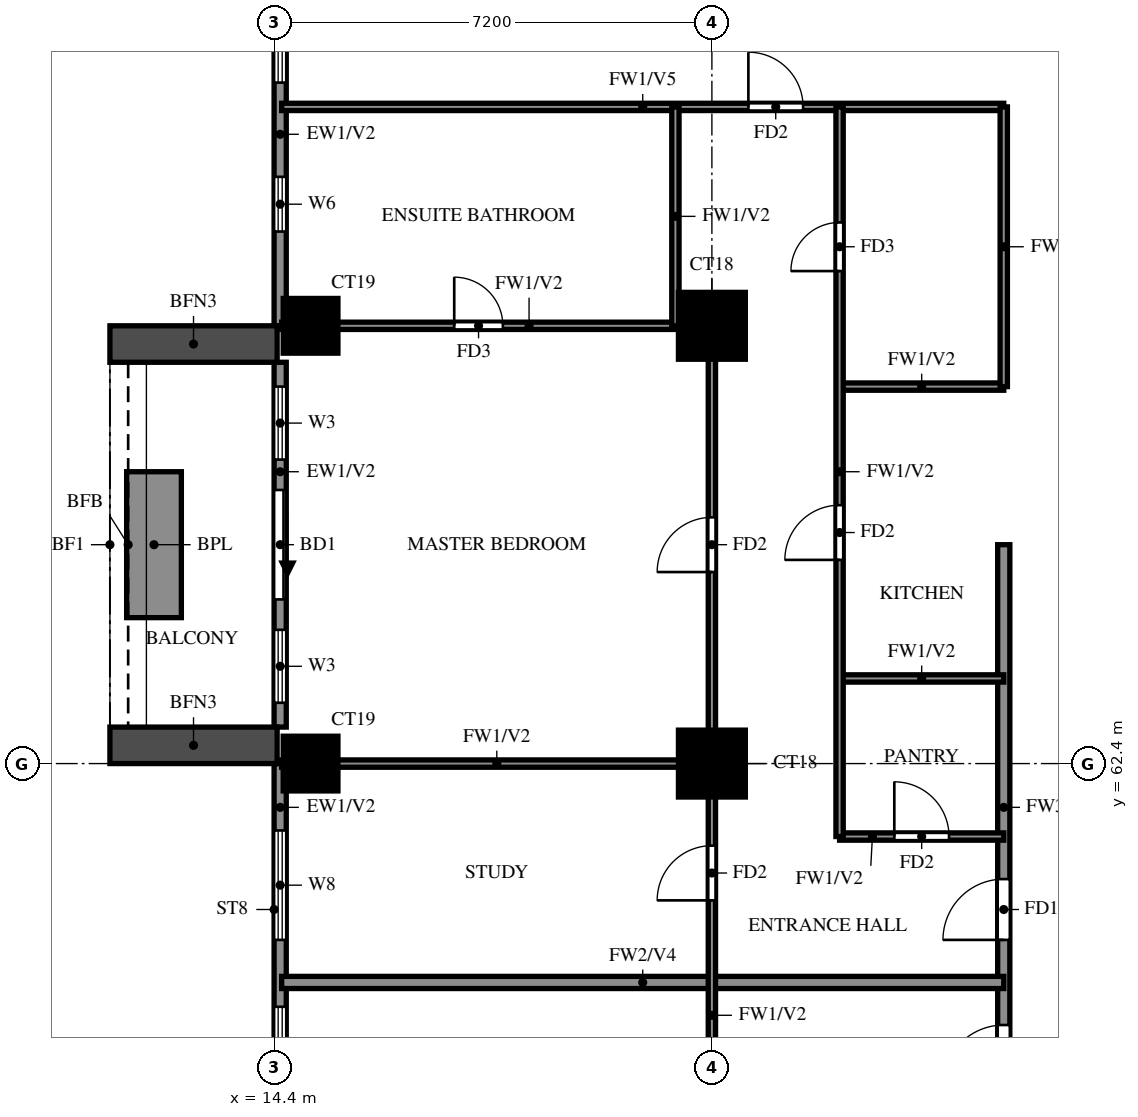
"""IFC4 building model, lengths in metres.
Left out: names, types, materials, properties, quantities, classifications, styles, units other than length and angle.
Written with IfcOpenShell. Run it as: python <this file> out.ifc"""

import sys

from ifc_helpers import new_model, si_unit, direction, frame, frame_2d, origin, origin_2d, place, context, subcontext, project, spatial, rectangle, extrude, source, transform, mapped, element, fill, save


model = new_model("IFC4")
c1 = context("Model", 3, precision=1e-05, world=origin(), true_north=direction((0.0, 1.0)))
c2 = subcontext(c1, "Body", "Model", "MODEL_VIEW")
j1 = project(units=[si_unit("LENGTHUNIT", "METRE"), si_unit("PLANEANGLEUNIT", "RADIAN")], contexts=[c1])
p1 = place(None, origin())
s1 = spatial("IfcSite", under=j1, at=p1, CompositionType="ELEMENT")
p2 = place(p1, origin())
s2 = spatial("IfcBuilding", under=s1, at=p2, CompositionType="ELEMENT")
p3 = place(p2, frame((0.0, 0.0, 130.5)))
s3 = spatial("IfcBuildingStorey", under=s2, at=p3, CompositionType="ELEMENT", Elevation=130.5)
m1 = source(origin(), c2, "Body", "SweptSolid", [
    extrude(rectangle(XDim=0.9, YDim=0.9, at=origin_2d()), origin(), (0.0, 0.0, 1.0), 3.2),
])
p4 = place(p3, frame((15.0, 62.4, 0.0), z_axis=(0.0, 0.0, 1.0), x_axis=(1.0, 0.0, 0.0)))
e1 = element("IfcColumn", 1, at=p4, inside=s3, PredefinedType="COLUMN", context=c2, shape_type="MappedRepresentation", body=[
    mapped(m1, transform((0.0, 0.0, 0.0))),
])
m2 = source(origin(), c2, "Body", "SweptSolid", [
    extrude(rectangle(XDim=1.1, YDim=1.1, at=origin_2d()), origin(), (0.0, 0.0, 1.0), 3.2),
])
p5 = place(p3, frame((21.6, 62.4, 0.0), z_axis=(0.0, 0.0, 1.0), x_axis=(1.0, 0.0, 0.0)))
e2 = element("IfcColumn", 2, at=p5, inside=s3, PredefinedType="COLUMN", context=c2, shape_type="MappedRepresentation", body=[
    mapped(m2, transform((0.0, 0.0, 0.0))),
])
p6 = place(p3, frame((15.0, 69.6, 0.0), z_axis=(0.0, 0.0, 1.0), x_axis=(1.0, 0.0, 0.0)))
e3 = element("IfcColumn", 3, at=p6, inside=s3, PredefinedType="COLUMN", context=c2, shape_type="MappedRepresentation", body=[
    mapped(m1, transform((0.0, 0.0, 0.0))),
])
p7 = place(p3, frame((21.6, 69.6, 0.0), z_axis=(0.0, 0.0, 1.0), x_axis=(1.0, 0.0, 0.0)))
e4 = element("IfcColumn", 4, at=p7, inside=s3, PredefinedType="COLUMN", context=c2, shape_type="MappedRepresentation", body=[
    mapped(m2, transform((0.0, 0.0, 0.0))),
])
p8 = place(p3, frame((14.5, 76.6, 0.0), z_axis=(0.0, 0.0, 1.0), x_axis=(0.0, -1.0, 0.0)))
e5 = element("IfcWall", 5, at=p8, inside=s3, PredefinedType="SOLIDWALL", context=c2, shape_type="SweptSolid", body=[
    extrude(rectangle(XDim=7.0, YDim=0.2, at=frame_2d((3.5, 0.0))), origin(), (0.0, 0.0, 1.0), 3.2),
])
p9 = place(p8, frame((4.55, 0.0, 1.5)))
e6 = element("IfcOpeningElement", 6, at=p9, cuts=e5, PredefinedType="OPENING", context=c2, shape_type="SweptSolid", body=[
    extrude(rectangle(XDim=0.9, YDim=0.9, at=frame_2d((0.45, 0.45))), frame((0.0, 0.11, 0.0), z_axis=(0.0, -1.0, 0.0), x_axis=(1.0, 0.0, 0.0)), (0.0, 0.0, 1.0), 0.22),
])
p10 = place(p8, frame((0.6, 0.0, 0.6)))
e7 = element("IfcOpeningElement", 7, at=p10, cuts=e5, PredefinedType="OPENING", context=c2, shape_type="SweptSolid", body=[
    extrude(rectangle(XDim=2.4, YDim=2.4, at=frame_2d((1.2, 1.2))), frame((0.0, 0.11, 0.0), z_axis=(0.0, -1.0, 0.0), x_axis=(1.0, 0.0, 0.0)), (0.0, 0.0, 1.0), 0.22),
])
p11 = place(p3, frame((14.5, 69.0, 0.0), z_axis=(0.0, 0.0, 1.0), x_axis=(0.0, -1.0, 0.0)))
e8 = element("IfcWall", 8, at=p11, inside=s3, PredefinedType="SOLIDWALL", context=c2, shape_type="SweptSolid", body=[
    extrude(rectangle(XDim=6.0, YDim=0.2, at=frame_2d((3.0, 0.0))), origin(), (0.0, 0.0, 1.0), 3.2),
])
p12 = place(p11, frame((2.1, 0.0, 0.0)))
e9 = element("IfcOpeningElement", 9, at=p12, cuts=e8, PredefinedType="OPENING", context=c2, shape_type="SweptSolid", body=[
    extrude(rectangle(XDim=1.8, YDim=2.4, at=frame_2d((0.9, 1.2))), frame((0.0, 0.11, 0.0), z_axis=(0.0, -1.0, 0.0), x_axis=(1.0, 0.0, 0.0)), (0.0, 0.0, 1.0), 0.22),
])
p13 = place(p11, frame((0.4, 0.0, 0.6)))
e10 = element("IfcOpeningElement", 10, at=p13, cuts=e8, PredefinedType="OPENING", context=c2, shape_type="SweptSolid", body=[
    extrude(rectangle(XDim=1.2, YDim=2.4, at=frame_2d((0.6, 1.2))), frame((0.0, 0.11, 0.0), z_axis=(0.0, -1.0, 0.0), x_axis=(1.0, 0.0, 0.0)), (0.0, 0.0, 1.0), 0.22),
])
p14 = place(p11, frame((4.4, 0.0, 0.6)))
e11 = element("IfcOpeningElement", 11, at=p14, cuts=e8, PredefinedType="OPENING", context=c2, shape_type="SweptSolid", body=[
    extrude(rectangle(XDim=1.2, YDim=2.4, at=frame_2d((0.6, 1.2))), frame((0.0, 0.11, 0.0), z_axis=(0.0, -1.0, 0.0), x_axis=(1.0, 0.0, 0.0)), (0.0, 0.0, 1.0), 0.22),
])
p15 = place(p3, frame((14.5, 62.4, 0.0), z_axis=(0.0, 0.0, 1.0), x_axis=(0.0, -1.0, 0.0)))
e12 = element("IfcWall", 12, at=p15, inside=s3, PredefinedType="SOLIDWALL", context=c2, shape_type="SweptSolid", body=[
    extrude(rectangle(XDim=7.2, YDim=0.2, at=frame_2d((3.6, 0.0))), origin(), (0.0, 0.0, 1.0), 3.2),
])
p16 = place(p15, frame((4.0, 0.0, 0.6)))
e13 = element("IfcOpeningElement", 13, at=p16, cuts=e12, PredefinedType="OPENING", context=c2, shape_type="SweptSolid", body=[
    extrude(rectangle(XDim=2.4, YDim=2.4, at=frame_2d((1.2, 1.2))), frame((0.0, 0.11, 0.0), z_axis=(0.0, -1.0, 0.0), x_axis=(1.0, 0.0, 0.0)), (0.0, 0.0, 1.0), 0.22),
])
p17 = place(p15, frame((1.1, 0.0, 0.6)))
e14 = element("IfcOpeningElement", 14, at=p17, cuts=e12, PredefinedType="OPENING", context=c2, shape_type="SweptSolid", body=[
    extrude(rectangle(XDim=1.8, YDim=2.4, at=frame_2d((0.9, 1.2))), frame((0.0, 0.11, 0.0), z_axis=(0.0, -1.0, 0.0), x_axis=(1.0, 0.0, 0.0)), (0.0, 0.0, 1.0), 0.22),
])
for number, where, z_axis, x_axis in (
    (15, (14.45, 69.3, 0.0), (0.0, 0.0, 1.0), (-1.0, 0.0, 0.0)),
    (16, (14.45, 62.7, 0.0), (0.0, 0.0, 1.0), (-1.0, 0.0, 0.0)),
):
    element("IfcWall", number, at=place(p3, frame(where, z_axis=z_axis, x_axis=x_axis)), inside=s3, PredefinedType="SOLIDWALL", context=c2, shape_type="SweptSolid", body=[
        extrude(rectangle(XDim=2.75, YDim=0.6, at=frame_2d((1.375, 0.0))), origin(), (0.0, 0.0, 1.0), 2.85),
    ])
p18 = place(p3, frame((12.425, 67.2, 0.0), z_axis=(0.0, 0.0, 1.0), x_axis=(0.0, -1.0, 0.0)))
e17 = element("IfcWall", 17, at=p18, inside=s3, PredefinedType="SOLIDWALL", context=c2, shape_type="SweptSolid", body=[
    extrude(rectangle(XDim=2.4, YDim=0.9, at=frame_2d((1.2, 0.0))), origin(), (0.0, 0.0, 1.0), 0.9),
])
p19 = place(p3, frame((26.4, 56.4, 0.0), z_axis=(0.0, 0.0, 1.0), x_axis=(0.0, 1.0, 0.0)))
e18 = element("IfcWall", 18, at=p19, inside=s3, PredefinedType="SOLIDWALL", context=c2, shape_type="SweptSolid", body=[
    extrude(rectangle(XDim=9.6, YDim=0.2, at=frame_2d((4.8, 0.0))), origin(), (0.0, 0.0, 1.0), 3.2),
])
p20 = place(p19, frame((0.7, 0.0, 0.0)))
e19 = element("IfcOpeningElement", 19, at=p20, cuts=e18, PredefinedType="OPENING", context=c2, shape_type="SweptSolid", body=[
    extrude(rectangle(XDim=1.0, YDim=2.1, at=frame_2d((0.5, 1.05))), frame((0.0, 0.11, 0.0), z_axis=(0.0, -1.0, 0.0), x_axis=(1.0, 0.0, 0.0)), (0.0, 0.0, 1.0), 0.22),
])
p21 = place(p19, frame((3.1, 0.0, 0.0)))
e20 = element("IfcOpeningElement", 20, at=p21, cuts=e18, PredefinedType="OPENING", context=c2, shape_type="SweptSolid", body=[
    extrude(rectangle(XDim=1.0, YDim=2.1, at=frame_2d((0.5, 1.05))), frame((0.0, 0.11, 0.0), z_axis=(0.0, -1.0, 0.0), x_axis=(1.0, 0.0, 0.0)), (0.0, 0.0, 1.0), 0.22),
])
p22 = place(p3, frame((14.525, 58.8, 0.0), z_axis=(0.0, 0.0, 1.0), x_axis=(1.0, 0.0, 0.0)))
e21 = element("IfcWall", 21, at=p22, inside=s3, PredefinedType="SOLIDWALL", context=c2, shape_type="SweptSolid", body=[
    extrude(rectangle(XDim=11.875, YDim=0.2, at=frame_2d((5.938, 0.0))), origin(), (0.0, 0.0, 1.0), 2.3),
])
p23 = place(p3, frame((23.7, 61.2, 0.0), z_axis=(0.0, 0.0, 1.0), x_axis=(1.0, 0.0, 0.0)))
e22 = element("IfcWall", 22, at=p23, inside=s3, PredefinedType="PARTITIONING", context=c2, shape_type="SweptSolid", body=[
    extrude(rectangle(XDim=2.7, YDim=0.12, at=frame_2d((1.35, 0.0))), origin(), (0.0, 0.0, 1.0), 3.2),
])
p24 = place(p23, frame((0.9, 0.0, 0.0)))
e23 = element("IfcOpeningElement", 23, at=p24, cuts=e22, PredefinedType="OPENING", context=c2, shape_type="SweptSolid", body=[
    extrude(rectangle(XDim=0.9, YDim=2.1, at=frame_2d((0.45, 1.05))), frame((0.0, 0.07, 0.0), z_axis=(0.0, -1.0, 0.0), x_axis=(1.0, 0.0, 0.0)), (0.0, 0.0, 1.0), 0.14),
])
p25 = place(p3, frame((14.525, 62.4, 0.0), z_axis=(0.0, 0.0, 1.0), x_axis=(1.0, 0.0, 0.0)))
e24 = element("IfcWall", 24, at=p25, inside=s3, PredefinedType="PARTITIONING", context=c2, shape_type="SweptSolid", body=[
    extrude(rectangle(XDim=7.075, YDim=0.12, at=frame_2d((3.538, 0.0))), origin(), (0.0, 0.0, 1.0), 3.2),
])
for number, where, z_axis, x_axis in (
    (25, (23.7, 63.8, 0.0), (0.0, 0.0, 1.0), (1.0, 0.0, 0.0)),
    (26, (23.7, 68.6, 0.0), (0.0, 0.0, 1.0), (1.0, 0.0, 0.0)),
):
    element("IfcWall", number, at=place(p3, frame(where, z_axis=z_axis, x_axis=x_axis)), inside=s3, PredefinedType="PARTITIONING", context=c2, shape_type="SweptSolid", body=[
        extrude(rectangle(XDim=2.7, YDim=0.12, at=frame_2d((1.35, 0.0))), origin(), (0.0, 0.0, 1.0), 3.2),
    ])
p26 = place(p3, frame((14.525, 69.6, 0.0), z_axis=(0.0, 0.0, 1.0), x_axis=(1.0, 0.0, 0.0)))
e27 = element("IfcWall", 27, at=p26, inside=s3, PredefinedType="PARTITIONING", context=c2, shape_type="SweptSolid", body=[
    extrude(rectangle(XDim=7.075, YDim=0.12, at=frame_2d((3.538, 0.0))), origin(), (0.0, 0.0, 1.0), 3.2),
])
p27 = place(p26, frame((2.837, 0.0, 0.0)))
e28 = element("IfcOpeningElement", 28, at=p27, cuts=e27, PredefinedType="OPENING", context=c2, shape_type="SweptSolid", body=[
    extrude(rectangle(XDim=0.8, YDim=2.1, at=frame_2d((0.4, 1.05))), frame((0.0, 0.07, 0.0), z_axis=(0.0, -1.0, 0.0), x_axis=(1.0, 0.0, 0.0)), (0.0, 0.0, 1.0), 0.14),
])
p28 = place(p3, frame((14.525, 73.2, 0.0), z_axis=(0.0, 0.0, 1.0), x_axis=(1.0, 0.0, 0.0)))
e29 = element("IfcWall", 29, at=p28, inside=s3, PredefinedType="PARTITIONING", context=c2, shape_type="SweptSolid", body=[
    extrude(rectangle(XDim=11.875, YDim=0.12, at=frame_2d((5.938, 0.0))), origin(), (0.0, 0.0, 1.0), 2.3),
])
p29 = place(p28, frame((7.675, 0.0, 0.0)))
e30 = element("IfcOpeningElement", 30, at=p29, cuts=e29, PredefinedType="OPENING", context=c2, shape_type="SweptSolid", body=[
    extrude(rectangle(XDim=0.9, YDim=2.1, at=frame_2d((0.45, 1.05))), frame((0.0, 0.07, 0.0), z_axis=(0.0, -1.0, 0.0), x_axis=(1.0, 0.0, 0.0)), (0.0, 0.0, 1.0), 0.14),
])
p30 = place(p3, frame((21.0, 69.6, 0.0), z_axis=(0.0, 0.0, 1.0), x_axis=(0.0, 1.0, 0.0)))
e31 = element("IfcWall", 31, at=p30, inside=s3, PredefinedType="PARTITIONING", context=c2, shape_type="SweptSolid", body=[
    extrude(rectangle(XDim=3.6, YDim=0.12, at=frame_2d((1.8, 0.0))), origin(), (0.0, 0.0, 1.0), 3.2),
])
p31 = place(p3, frame((21.6, 48.0, 0.0), z_axis=(0.0, 0.0, 1.0), x_axis=(0.0, 1.0, 0.0)))
e32 = element("IfcWall", 32, at=p31, inside=s3, PredefinedType="PARTITIONING", context=c2, shape_type="SweptSolid", body=[
    extrude(rectangle(XDim=21.6, YDim=0.12, at=frame_2d((10.8, 0.0))), origin(), (0.0, 0.0, 1.0), 3.2),
])
p32 = place(p31, frame((1.35, 0.0, 0.0)))
e33 = element("IfcOpeningElement", 33, at=p32, cuts=e32, PredefinedType="OPENING", context=c2, shape_type="SweptSolid", body=[
    extrude(rectangle(XDim=0.9, YDim=2.1, at=frame_2d((0.45, 1.05))), frame((0.0, 0.07, 0.0), z_axis=(0.0, -1.0, 0.0), x_axis=(1.0, 0.0, 0.0)), (0.0, 0.0, 1.0), 0.14),
])
p33 = place(p31, frame((7.95, 0.0, 0.0)))
e34 = element("IfcOpeningElement", 34, at=p33, cuts=e32, PredefinedType="OPENING", context=c2, shape_type="SweptSolid", body=[
    extrude(rectangle(XDim=1.5, YDim=2.1, at=frame_2d((0.75, 1.05))), frame((0.0, 0.07, 0.0), z_axis=(0.0, -1.0, 0.0), x_axis=(1.0, 0.0, 0.0)), (0.0, 0.0, 1.0), 0.14),
])
p34 = place(p31, frame((12.15, 0.0, 0.0)))
e35 = element("IfcOpeningElement", 35, at=p34, cuts=e32, PredefinedType="OPENING", context=c2, shape_type="SweptSolid", body=[
    extrude(rectangle(XDim=0.9, YDim=2.1, at=frame_2d((0.45, 1.05))), frame((0.0, 0.07, 0.0), z_axis=(0.0, -1.0, 0.0), x_axis=(1.0, 0.0, 0.0)), (0.0, 0.0, 1.0), 0.14),
])
p35 = place(p31, frame((17.55, 0.0, 0.0)))
e36 = element("IfcOpeningElement", 36, at=p35, cuts=e32, PredefinedType="OPENING", context=c2, shape_type="SweptSolid", body=[
    extrude(rectangle(XDim=0.9, YDim=2.1, at=frame_2d((0.45, 1.05))), frame((0.0, 0.07, 0.0), z_axis=(0.0, -1.0, 0.0), x_axis=(1.0, 0.0, 0.0)), (0.0, 0.0, 1.0), 0.14),
])
p36 = place(p3, frame((23.7, 61.2, 0.0), z_axis=(0.0, 0.0, 1.0), x_axis=(0.0, 1.0, 0.0)))
e37 = element("IfcWall", 37, at=p36, inside=s3, PredefinedType="PARTITIONING", context=c2, shape_type="SweptSolid", body=[
    extrude(rectangle(XDim=12.0, YDim=0.12, at=frame_2d((6.0, 0.0))), origin(), (0.0, 0.0, 1.0), 3.2),
])
p37 = place(p36, frame((4.55, 0.0, 0.0)))
e38 = element("IfcOpeningElement", 38, at=p37, cuts=e37, PredefinedType="OPENING", context=c2, shape_type="SweptSolid", body=[
    extrude(rectangle(XDim=0.9, YDim=2.1, at=frame_2d((0.45, 1.05))), frame((0.0, 0.07, 0.0), z_axis=(0.0, -1.0, 0.0), x_axis=(1.0, 0.0, 0.0)), (0.0, 0.0, 1.0), 0.14),
])
p38 = place(p36, frame((9.3, 0.0, 0.0)))
e39 = element("IfcOpeningElement", 39, at=p38, cuts=e37, PredefinedType="OPENING", context=c2, shape_type="SweptSolid", body=[
    extrude(rectangle(XDim=0.8, YDim=2.1, at=frame_2d((0.4, 1.05))), frame((0.0, 0.07, 0.0), z_axis=(0.0, -1.0, 0.0), x_axis=(1.0, 0.0, 0.0)), (0.0, 0.0, 1.0), 0.14),
])
p39 = place(p3, frame((26.4, 68.6, 0.0), z_axis=(0.0, 0.0, 1.0), x_axis=(0.0, 1.0, 0.0)))
e40 = element("IfcWall", 40, at=p39, inside=s3, PredefinedType="PARTITIONING", context=c2, shape_type="SweptSolid", body=[
    extrude(rectangle(XDim=4.6, YDim=0.12, at=frame_2d((2.3, 0.0))), origin(), (0.0, 0.0, 1.0), 3.2),
])
p40 = place(p9, origin())
e41 = element("IfcWindow", 41, at=p40, inside=s3, PartitioningType="SINGLE_PANEL", PredefinedType="WINDOW", context=c2, shape_type="SweptSolid", body=[
    extrude(rectangle(XDim=0.9, YDim=0.9, at=frame_2d((0.45, 0.45))), frame((0.0, 0.03, 0.0), z_axis=(0.0, -1.0, 0.0), x_axis=(1.0, 0.0, 0.0)), (0.0, 0.0, 1.0), 0.06),
])
fill(e6, e41)
p41 = place(p10, origin())
e42 = element("IfcWindow", 42, at=p41, inside=s3, PartitioningType="DOUBLE_PANEL_VERTICAL", PredefinedType="WINDOW", context=c2, shape_type="SweptSolid", body=[
    extrude(rectangle(XDim=2.4, YDim=2.4, at=frame_2d((1.2, 1.2))), frame((0.0, 0.03, 0.0), z_axis=(0.0, -1.0, 0.0), x_axis=(1.0, 0.0, 0.0)), (0.0, 0.0, 1.0), 0.06),
])
fill(e7, e42)
p42 = place(p12, origin())
e43 = element("IfcDoor", 43, at=p42, inside=s3, OperationType="DOUBLE_DOOR_SLIDING", PredefinedType="DOOR", context=c2, shape_type="SweptSolid", body=[
    extrude(rectangle(XDim=1.8, YDim=2.4, at=frame_2d((0.9, 1.2))), frame((0.0, 0.025, 0.0), z_axis=(0.0, -1.0, 0.0), x_axis=(1.0, 0.0, 0.0)), (0.0, 0.0, 1.0), 0.05),
])
fill(e9, e43)
p43 = place(p13, origin())
e44 = element("IfcWindow", 44, at=p43, inside=s3, PartitioningType="SINGLE_PANEL", PredefinedType="WINDOW", context=c2, shape_type="SweptSolid", body=[
    extrude(rectangle(XDim=1.2, YDim=2.4, at=frame_2d((0.6, 1.2))), frame((0.0, 0.03, 0.0), z_axis=(0.0, -1.0, 0.0), x_axis=(1.0, 0.0, 0.0)), (0.0, 0.0, 1.0), 0.06),
])
fill(e10, e44)
p44 = place(p14, origin())
e45 = element("IfcWindow", 45, at=p44, inside=s3, PartitioningType="SINGLE_PANEL", PredefinedType="WINDOW", context=c2, shape_type="SweptSolid", body=[
    extrude(rectangle(XDim=1.2, YDim=2.4, at=frame_2d((0.6, 1.2))), frame((0.0, 0.03, 0.0), z_axis=(0.0, -1.0, 0.0), x_axis=(1.0, 0.0, 0.0)), (0.0, 0.0, 1.0), 0.06),
])
fill(e11, e45)
p45 = place(p16, origin())
e46 = element("IfcWindow", 46, at=p45, inside=s3, PartitioningType="DOUBLE_PANEL_VERTICAL", PredefinedType="WINDOW", context=c2, shape_type="SweptSolid", body=[
    extrude(rectangle(XDim=2.4, YDim=2.4, at=frame_2d((1.2, 1.2))), frame((0.0, 0.03, 0.0), z_axis=(0.0, -1.0, 0.0), x_axis=(1.0, 0.0, 0.0)), (0.0, 0.0, 1.0), 0.06),
])
fill(e13, e46)
p46 = place(p17, origin())
e47 = element("IfcWindow", 47, at=p46, inside=s3, PartitioningType="DOUBLE_PANEL_VERTICAL", PredefinedType="WINDOW", context=c2, shape_type="SweptSolid", body=[
    extrude(rectangle(XDim=1.8, YDim=2.4, at=frame_2d((0.9, 1.2))), frame((0.0, 0.03, 0.0), z_axis=(0.0, -1.0, 0.0), x_axis=(1.0, 0.0, 0.0)), (0.0, 0.0, 1.0), 0.06),
])
fill(e14, e47)
p47 = place(p20, origin())
e48 = element("IfcDoor", 48, at=p47, inside=s3, OperationType="SINGLE_SWING_LEFT", PredefinedType="DOOR", context=c2, shape_type="SweptSolid", body=[
    extrude(rectangle(XDim=1.0, YDim=2.1, at=frame_2d((0.5, 1.05))), frame((0.0, 0.025, 0.0), z_axis=(0.0, -1.0, 0.0), x_axis=(1.0, 0.0, 0.0)), (0.0, 0.0, 1.0), 0.05),
])
fill(e19, e48)
p48 = place(p21, origin())
e49 = element("IfcDoor", 49, at=p48, inside=s3, OperationType="SINGLE_SWING_RIGHT", PredefinedType="DOOR", context=c2, shape_type="SweptSolid", body=[
    extrude(rectangle(XDim=1.0, YDim=2.1, at=frame_2d((0.5, 1.05))), frame((0.0, 0.025, 0.0), z_axis=(0.0, -1.0, 0.0), x_axis=(1.0, 0.0, 0.0)), (0.0, 0.0, 1.0), 0.05),
])
fill(e20, e49)
p49 = place(p34, origin())
e50 = element("IfcDoor", 50, at=p49, inside=s3, OperationType="SINGLE_SWING_LEFT", PredefinedType="DOOR", context=c2, shape_type="SweptSolid", body=[
    extrude(rectangle(XDim=0.9, YDim=2.1, at=frame_2d((0.45, 1.05))), frame((0.0, 0.025, 0.0), z_axis=(0.0, -1.0, 0.0), x_axis=(1.0, 0.0, 0.0)), (0.0, 0.0, 1.0), 0.05),
])
fill(e35, e50)
p50 = place(p35, origin())
e51 = element("IfcDoor", 51, at=p50, inside=s3, OperationType="SINGLE_SWING_LEFT", PredefinedType="DOOR", context=c2, shape_type="SweptSolid", body=[
    extrude(rectangle(XDim=0.9, YDim=2.1, at=frame_2d((0.45, 1.05))), frame((0.0, 0.025, 0.0), z_axis=(0.0, -1.0, 0.0), x_axis=(1.0, 0.0, 0.0)), (0.0, 0.0, 1.0), 0.05),
])
fill(e36, e51)
p51 = place(p27, origin())
e52 = element("IfcDoor", 52, at=p51, inside=s3, OperationType="SINGLE_SWING_RIGHT", PredefinedType="DOOR", context=c2, shape_type="SweptSolid", body=[
    extrude(rectangle(XDim=0.8, YDim=2.1, at=frame_2d((0.4, 1.05))), frame((0.0, 0.025, 0.0), z_axis=(0.0, -1.0, 0.0), x_axis=(1.0, 0.0, 0.0)), (0.0, 0.0, 1.0), 0.05),
])
fill(e28, e52)
p52 = place(p29, origin())
e53 = element("IfcDoor", 53, at=p52, inside=s3, OperationType="SINGLE_SWING_LEFT", PredefinedType="DOOR", context=c2, shape_type="SweptSolid", body=[
    extrude(rectangle(XDim=0.9, YDim=2.1, at=frame_2d((0.45, 1.05))), frame((0.0, 0.025, 0.0), z_axis=(0.0, -1.0, 0.0), x_axis=(1.0, 0.0, 0.0)), (0.0, 0.0, 1.0), 0.05),
])
fill(e30, e53)
p53 = place(p24, origin())
e54 = element("IfcDoor", 54, at=p53, inside=s3, OperationType="SINGLE_SWING_LEFT", PredefinedType="DOOR", context=c2, shape_type="SweptSolid", body=[
    extrude(rectangle(XDim=0.9, YDim=2.1, at=frame_2d((0.45, 1.05))), frame((0.0, 0.025, 0.0), z_axis=(0.0, -1.0, 0.0), x_axis=(1.0, 0.0, 0.0)), (0.0, 0.0, 1.0), 0.05),
])
fill(e23, e54)
p54 = place(p37, origin())
e55 = element("IfcDoor", 55, at=p54, inside=s3, OperationType="SINGLE_SWING_RIGHT", PredefinedType="DOOR", context=c2, shape_type="SweptSolid", body=[
    extrude(rectangle(XDim=0.9, YDim=2.1, at=frame_2d((0.45, 1.05))), frame((0.0, 0.025, 0.0), z_axis=(0.0, -1.0, 0.0), x_axis=(1.0, 0.0, 0.0)), (0.0, 0.0, 1.0), 0.05),
])
fill(e38, e55)
p55 = place(p38, origin())
e56 = element("IfcDoor", 56, at=p55, inside=s3, OperationType="SINGLE_SWING_LEFT", PredefinedType="DOOR", context=c2, shape_type="SweptSolid", body=[
    extrude(rectangle(XDim=0.8, YDim=2.1, at=frame_2d((0.4, 1.05))), frame((0.0, 0.025, 0.0), z_axis=(0.0, -1.0, 0.0), x_axis=(1.0, 0.0, 0.0)), (0.0, 0.0, 1.0), 0.05),
])
fill(e39, e56)
save(model, sys.argv[1])
